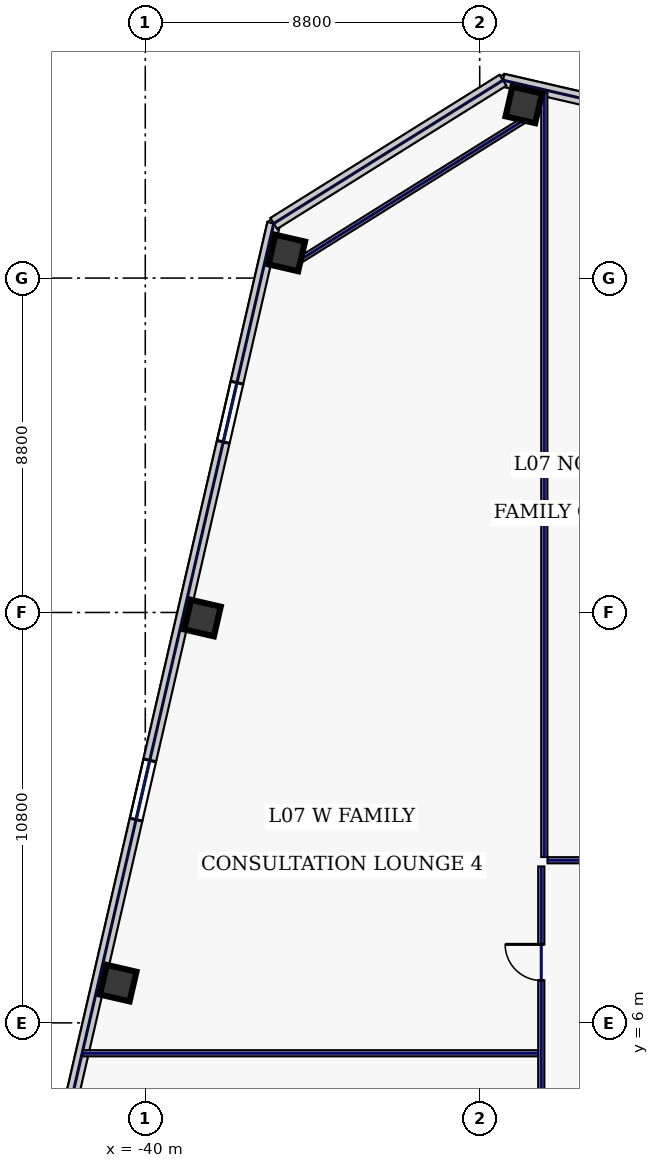
"""IFC4 building model, lengths in metres.
Left out: names, types, materials, properties, quantities, classifications, styles, units other than length and angle.
Written with IfcOpenShell. Run it as: python <this file> out.ifc"""

import sys

from ifc_helpers import new_model, si_unit, direction, frame, frame_2d, origin, origin_2d, place, context, subcontext, project, spatial, rectangle, hollow_rectangle, extrude, element, fill, save


model = new_model("IFC4")
c1 = context("Model", 3, precision=1e-05, world=origin(), true_north=direction((0.0, 1.0)))
c2 = subcontext(c1, "Body", "Model", "MODEL_VIEW")
j1 = project(units=[si_unit("LENGTHUNIT", "METRE"), si_unit("PLANEANGLEUNIT", "RADIAN")], contexts=[c1])
p1 = place(None, origin())
s1 = spatial("IfcSite", under=j1, at=p1, CompositionType="ELEMENT")
p2 = place(p1, origin())
s2 = spatial("IfcBuilding", under=s1, at=p2, CompositionType="ELEMENT")
p3 = place(p2, frame((0.0, 0.0, 39.4)))
s3 = spatial("IfcBuildingStorey", under=s2, at=p3, CompositionType="ELEMENT", Elevation=39.4)
for number, where, z_axis, x_axis in (
    (1, (-30.04, 30.156, 0.0), (0.0, 0.0, 1.0), (0.974, -0.225, 0.0)),
    (2, (-36.276, 26.26, 0.0), (0.0, 0.0, 1.0), (0.974, -0.225, 0.0)),
    (3, (-38.494, 16.652, 0.0), (0.0, 0.0, 1.0), (0.974, -0.225, 0.0)),
    (4, (-40.712, 7.045, 0.0), (0.0, 0.0, 1.0), (0.974, -0.225, 0.0)),
):
    element("IfcColumn", number, at=place(p3, frame(where, z_axis=z_axis, x_axis=x_axis)), inside=s3, PredefinedType="COLUMN", context=c2, shape_type="SweptSolid", body=[
        extrude(hollow_rectangle(XDim=0.8, YDim=0.8, WallThickness=0.036, at=origin_2d()), origin(), (0.0, 0.0, 1.0), 3.74),
    ])
p4 = place(p3, frame((-8.517, 25.711, 0.0), z_axis=(0.0, 0.0, 1.0), x_axis=(-0.974372845456, 0.224939009598, 0.0)))
e5 = element("IfcWall", 5, at=p4, inside=s3, PredefinedType="STANDARD", context=c2, shape_type="SweptSolid", body=[
    extrude(rectangle(XDim=22.652, YDim=0.34, at=frame_2d((11.326, 0.0))), origin(), (0.0, 0.0, 1.0), 3.74),
])
p5 = place(p4, frame((18.539, 0.0, 0.22)))
e6 = element("IfcOpeningElement", 6, at=p5, cuts=e5, PredefinedType="OPENING", context=c2, shape_type="SweptSolid", body=[
    extrude(rectangle(XDim=1.6, YDim=1.2, at=frame_2d((0.8, 0.6))), frame((0.0, 0.18, 0.0), z_axis=(0.0, -1.0, 0.0), x_axis=(1.0, 0.0, 0.0)), (0.0, 0.0, 1.0), 0.36),
])
p6 = place(p4, frame((14.055, 0.0, 0.22)))
e7 = element("IfcOpeningElement", 7, at=p6, cuts=e5, PredefinedType="OPENING", context=c2, shape_type="SweptSolid", body=[
    extrude(rectangle(XDim=1.6, YDim=1.2, at=frame_2d((0.8, 0.6))), frame((0.0, 0.18, 0.0), z_axis=(0.0, -1.0, 0.0), x_axis=(1.0, 0.0, 0.0)), (0.0, 0.0, 1.0), 0.36),
])
p7 = place(p4, frame((8.791, 0.0, 0.22)))
e8 = element("IfcOpeningElement", 8, at=p7, cuts=e5, PredefinedType="OPENING", context=c2, shape_type="SweptSolid", body=[
    extrude(rectangle(XDim=1.6, YDim=1.2, at=frame_2d((0.8, 0.6))), frame((0.0, 0.18, 0.0), z_axis=(0.0, -1.0, 0.0), x_axis=(1.0, 0.0, 0.0)), (0.0, 0.0, 1.0), 0.36),
])
p8 = place(p4, frame((4.306, 0.0, 0.22)))
e9 = element("IfcOpeningElement", 9, at=p8, cuts=e5, PredefinedType="OPENING", context=c2, shape_type="SweptSolid", body=[
    extrude(rectangle(XDim=1.6, YDim=1.2, at=frame_2d((0.8, 0.6))), frame((0.0, 0.18, 0.0), z_axis=(0.0, -1.0, 0.0), x_axis=(1.0, 0.0, 0.0)), (0.0, 0.0, 1.0), 0.36),
])
p9 = place(p3, frame((-36.62, 27.037, 0.0), z_axis=(0.0, 0.0, 1.0), x_axis=(-0.224951280646, -0.974370012539, 0.0)))
e10 = element("IfcWall", 10, at=p9, inside=s3, PredefinedType="STANDARD", context=c2, shape_type="SweptSolid", body=[
    extrude(rectangle(XDim=40.8, YDim=0.34, at=frame_2d((20.4, 0.0))), origin(), (0.0, 0.0, 1.0), 3.74),
])
p10 = place(p9, frame((4.3, 0.0, 0.22)))
e11 = element("IfcOpeningElement", 11, at=p10, cuts=e10, PredefinedType="OPENING", context=c2, shape_type="SweptSolid", body=[
    extrude(rectangle(XDim=1.6, YDim=1.2, at=frame_2d((0.8, 0.6))), frame((0.0, 0.18, 0.0), z_axis=(0.0, -1.0, 0.0), x_axis=(1.0, 0.0, 0.0)), (0.0, 0.0, 1.0), 0.36),
])
p11 = place(p9, frame((14.5, 0.0, 0.22)))
e12 = element("IfcOpeningElement", 12, at=p11, cuts=e10, PredefinedType="OPENING", context=c2, shape_type="SweptSolid", body=[
    extrude(rectangle(XDim=1.6, YDim=1.2, at=frame_2d((0.8, 0.6))), frame((0.0, 0.18, 0.0), z_axis=(0.0, -1.0, 0.0), x_axis=(1.0, 0.0, 0.0)), (0.0, 0.0, 1.0), 0.36),
])
p12 = place(p9, frame((24.7, 0.0, 0.22)))
e13 = element("IfcOpeningElement", 13, at=p12, cuts=e10, PredefinedType="OPENING", context=c2, shape_type="SweptSolid", body=[
    extrude(rectangle(XDim=1.6, YDim=1.2, at=frame_2d((0.8, 0.6))), frame((0.0, 0.18, 0.0), z_axis=(0.0, -1.0, 0.0), x_axis=(1.0, 0.0, 0.0)), (0.0, 0.0, 1.0), 0.36),
])
p13 = place(p9, frame((34.9, 0.0, 0.22)))
e14 = element("IfcOpeningElement", 14, at=p13, cuts=e10, PredefinedType="OPENING", context=c2, shape_type="SweptSolid", body=[
    extrude(rectangle(XDim=1.6, YDim=1.2, at=frame_2d((0.8, 0.6))), frame((0.0, 0.18, 0.0), z_axis=(0.0, -1.0, 0.0), x_axis=(1.0, 0.0, 0.0)), (0.0, 0.0, 1.0), 0.36),
])
p14 = place(p3, frame((-30.588, 30.807, 0.0), z_axis=(0.0, 0.0, 1.0), x_axis=(-0.848031080615, -0.529946493819, 0.0)))
e15 = element("IfcWall", 15, at=p14, inside=s3, PredefinedType="STANDARD", context=c2, shape_type="SweptSolid", body=[
    extrude(rectangle(XDim=7.114, YDim=0.34, at=frame_2d((3.557, 0.0))), origin(), (0.0, 0.0, 1.0), 3.74),
])
p15 = place(p3, frame((-29.86, 29.868, 0.0), z_axis=(0.0, 0.0, 1.0), x_axis=(-0.848043064089, -0.529927317139, 0.0)))
e16 = element("IfcWall", 16, at=p15, inside=s3, PredefinedType="PARTITIONING", context=c2, shape_type="SweptSolid", body=[
    extrude(rectangle(XDim=7.354, YDim=0.16, at=frame_2d((3.677, 0.0))), origin(), (0.0, 0.0, 1.0), 1.535),
])
p16 = place(p3, frame((-29.58, -10.015, 0.0), z_axis=(0.0, 0.0, 1.0), x_axis=(0.0, 1.0, 0.0)))
e17 = element("IfcWall", 17, at=p16, inside=s3, PredefinedType="PARTITIONING", context=c2, shape_type="SweptSolid", body=[
    extrude(rectangle(XDim=20.13, YDim=0.16, at=frame_2d((10.065, 0.0))), origin(), (0.0, 0.0, 1.0), 3.74),
])
p17 = place(p16, frame((2.169, 0.0, 0.0)))
e18 = element("IfcOpeningElement", 18, at=p17, cuts=e17, PredefinedType="OPENING", context=c2, shape_type="SweptSolid", body=[
    extrude(rectangle(XDim=0.95, YDim=2.2, at=frame_2d((0.475, 1.1))), frame((0.0, 0.09, 0.0), z_axis=(0.0, -1.0, 0.0), x_axis=(1.0, 0.0, 0.0)), (0.0, 0.0, 1.0), 0.18),
])
p18 = place(p16, frame((7.025, 0.0, 0.0)))
e19 = element("IfcOpeningElement", 19, at=p18, cuts=e17, PredefinedType="OPENING", context=c2, shape_type="SweptSolid", body=[
    extrude(rectangle(XDim=0.95, YDim=2.2, at=frame_2d((0.475, 1.1))), frame((0.0, 0.09, 0.0), z_axis=(0.0, -1.0, 0.0), x_axis=(1.0, 0.0, 0.0)), (0.0, 0.0, 1.0), 0.18),
])
p19 = place(p16, frame((12.225, 0.0, 0.0)))
e20 = element("IfcOpeningElement", 20, at=p19, cuts=e17, PredefinedType="OPENING", context=c2, shape_type="SweptSolid", body=[
    extrude(rectangle(XDim=0.95, YDim=2.2, at=frame_2d((0.475, 1.1))), frame((0.0, 0.09, 0.0), z_axis=(0.0, -1.0, 0.0), x_axis=(1.0, 0.0, 0.0)), (0.0, 0.0, 1.0), 0.18),
])
p20 = place(p16, frame((17.131, 0.0, 0.0)))
e21 = element("IfcOpeningElement", 21, at=p20, cuts=e17, PredefinedType="OPENING", context=c2, shape_type="SweptSolid", body=[
    extrude(rectangle(XDim=0.95, YDim=2.2, at=frame_2d((0.475, 1.1))), frame((0.0, 0.09, 0.0), z_axis=(0.0, -1.0, 0.0), x_axis=(1.0, 0.0, 0.0)), (0.0, 0.0, 1.0), 0.18),
])
p21 = place(p3, frame((-29.415, 10.28, 0.0), z_axis=(0.0, 0.0, 1.0), x_axis=(1.0, 0.0, 0.0)))
e22 = element("IfcWall", 22, at=p21, inside=s3, PredefinedType="PARTITIONING", context=c2, shape_type="SweptSolid", body=[
    extrude(rectangle(XDim=58.83, YDim=0.16, at=frame_2d((29.415, 0.0))), origin(), (0.0, 0.0, 1.0), 3.74),
])
p22 = place(p21, frame((2.044, 0.0, 0.0)))
e23 = element("IfcOpeningElement", 23, at=p22, cuts=e22, PredefinedType="OPENING", context=c2, shape_type="SweptSolid", body=[
    extrude(rectangle(XDim=0.95, YDim=2.2, at=frame_2d((0.475, 1.1))), frame((0.0, 0.09, 0.0), z_axis=(0.0, -1.0, 0.0), x_axis=(1.0, 0.0, 0.0)), (0.0, 0.0, 1.0), 0.18),
])
p23 = place(p21, frame((6.647, 0.0, 0.0)))
e24 = element("IfcOpeningElement", 24, at=p23, cuts=e22, PredefinedType="OPENING", context=c2, shape_type="SweptSolid", body=[
    extrude(rectangle(XDim=1.3, YDim=2.2, at=frame_2d((0.65, 1.1))), frame((0.0, 0.09, 0.0), z_axis=(0.0, -1.0, 0.0), x_axis=(1.0, 0.0, 0.0)), (0.0, 0.0, 1.0), 0.18),
])
p24 = place(p21, frame((11.492, 0.0, 0.0)))
e25 = element("IfcOpeningElement", 25, at=p24, cuts=e22, PredefinedType="OPENING", context=c2, shape_type="SweptSolid", body=[
    extrude(rectangle(XDim=1.3, YDim=2.2, at=frame_2d((0.65, 1.1))), frame((0.0, 0.09, 0.0), z_axis=(0.0, -1.0, 0.0), x_axis=(1.0, 0.0, 0.0)), (0.0, 0.0, 1.0), 0.18),
])
p25 = place(p21, frame((16.555, 0.0, 0.0)))
e26 = element("IfcOpeningElement", 26, at=p25, cuts=e22, PredefinedType="OPENING", context=c2, shape_type="SweptSolid", body=[
    extrude(rectangle(XDim=1.3, YDim=2.2, at=frame_2d((0.65, 1.1))), frame((0.0, 0.09, 0.0), z_axis=(0.0, -1.0, 0.0), x_axis=(1.0, 0.0, 0.0)), (0.0, 0.0, 1.0), 0.18),
])
p26 = place(p21, frame((22.01, 0.0, 0.0)))
e27 = element("IfcOpeningElement", 27, at=p26, cuts=e22, PredefinedType="OPENING", context=c2, shape_type="SweptSolid", body=[
    extrude(rectangle(XDim=0.95, YDim=2.2, at=frame_2d((0.475, 1.1))), frame((0.0, 0.09, 0.0), z_axis=(0.0, -1.0, 0.0), x_axis=(1.0, 0.0, 0.0)), (0.0, 0.0, 1.0), 0.18),
])
p27 = place(p21, frame((26.58, 0.0, 0.0)))
e28 = element("IfcOpeningElement", 28, at=p27, cuts=e22, PredefinedType="OPENING", context=c2, shape_type="SweptSolid", body=[
    extrude(rectangle(XDim=0.95, YDim=2.2, at=frame_2d((0.475, 1.1))), frame((0.0, 0.09, 0.0), z_axis=(0.0, -1.0, 0.0), x_axis=(1.0, 0.0, 0.0)), (0.0, 0.0, 1.0), 0.18),
])
p28 = place(p21, frame((32.435, 0.0, 0.0)))
e29 = element("IfcOpeningElement", 29, at=p28, cuts=e22, PredefinedType="OPENING", context=c2, shape_type="SweptSolid", body=[
    extrude(rectangle(XDim=0.95, YDim=2.2, at=frame_2d((0.475, 1.1))), frame((0.0, 0.09, 0.0), z_axis=(0.0, -1.0, 0.0), x_axis=(1.0, 0.0, 0.0)), (0.0, 0.0, 1.0), 0.18),
])
p29 = place(p21, frame((41.18, 0.0, 0.0)))
e30 = element("IfcOpeningElement", 30, at=p29, cuts=e22, PredefinedType="OPENING", context=c2, shape_type="SweptSolid", body=[
    extrude(rectangle(XDim=1.05, YDim=2.2, at=frame_2d((0.525, 1.1))), frame((0.0, 0.09, 0.0), z_axis=(0.0, -1.0, 0.0), x_axis=(1.0, 0.0, 0.0)), (0.0, 0.0, 1.0), 0.18),
])
p30 = place(p21, frame((50.025, 0.0, 0.0)))
e31 = element("IfcOpeningElement", 31, at=p30, cuts=e22, PredefinedType="OPENING", context=c2, shape_type="SweptSolid", body=[
    extrude(rectangle(XDim=0.95, YDim=2.2, at=frame_2d((0.475, 1.1))), frame((0.0, 0.09, 0.0), z_axis=(0.0, -1.0, 0.0), x_axis=(1.0, 0.0, 0.0)), (0.0, 0.0, 1.0), 0.18),
])
p31 = place(p21, frame((55.981, 0.0, 0.0)))
e32 = element("IfcOpeningElement", 32, at=p31, cuts=e22, PredefinedType="OPENING", context=c2, shape_type="SweptSolid", body=[
    extrude(rectangle(XDim=0.95, YDim=2.2, at=frame_2d((0.475, 1.1))), frame((0.0, 0.09, 0.0), z_axis=(0.0, -1.0, 0.0), x_axis=(1.0, 0.0, 0.0)), (0.0, 0.0, 1.0), 0.18),
])
p32 = place(p3, frame((-29.5, 10.365, 0.0), z_axis=(0.0, 0.0, 1.0), x_axis=(0.0, 1.0, 0.0)))
e33 = element("IfcWall", 33, at=p32, inside=s3, PredefinedType="PARTITIONING", context=c2, shape_type="SweptSolid", body=[
    extrude(rectangle(XDim=20.119, YDim=0.16, at=frame_2d((10.059, 0.0))), origin(), (0.0, 0.0, 1.0), 3.74),
])
p33 = place(p3, frame((-41.641, 5.2, 0.0), z_axis=(0.0, 0.0, 1.0), x_axis=(1.0, 0.0, 0.0)))
e34 = element("IfcWall", 34, at=p33, inside=s3, PredefinedType="PARTITIONING", context=c2, shape_type="SweptSolid", body=[
    extrude(rectangle(XDim=11.976, YDim=0.16, at=frame_2d((5.988, 0.0))), origin(), (0.0, 0.0, 1.0), 3.74),
])
p34 = place(p10, origin())
e35 = element("IfcWindow", 35, at=p34, inside=s3, PartitioningType="SINGLE_PANEL", PredefinedType="WINDOW", context=c2, shape_type="SweptSolid", body=[
    extrude(rectangle(XDim=1.6, YDim=1.2, at=frame_2d((0.8, 0.6))), frame((0.0, 0.03, 0.0), z_axis=(0.0, -1.0, 0.0), x_axis=(1.0, 0.0, 0.0)), (0.0, 0.0, 1.0), 0.06),
])
fill(e11, e35)
p35 = place(p11, origin())
e36 = element("IfcWindow", 36, at=p35, inside=s3, PartitioningType="SINGLE_PANEL", PredefinedType="WINDOW", context=c2, shape_type="SweptSolid", body=[
    extrude(rectangle(XDim=1.6, YDim=1.2, at=frame_2d((0.8, 0.6))), frame((0.0, 0.03, 0.0), z_axis=(0.0, -1.0, 0.0), x_axis=(1.0, 0.0, 0.0)), (0.0, 0.0, 1.0), 0.06),
])
fill(e12, e36)
p36 = place(p20, origin())
e37 = element("IfcDoor", 37, at=p36, inside=s3, OperationType="SINGLE_SWING_RIGHT", PredefinedType="DOOR", context=c2, shape_type="SweptSolid", body=[
    extrude(rectangle(XDim=0.95, YDim=2.2, at=frame_2d((0.475, 1.1))), frame((0.0, 0.025, 0.0), z_axis=(0.0, -1.0, 0.0), x_axis=(1.0, 0.0, 0.0)), (0.0, 0.0, 1.0), 0.05),
])
fill(e21, e37)
save(model, sys.argv[1])
